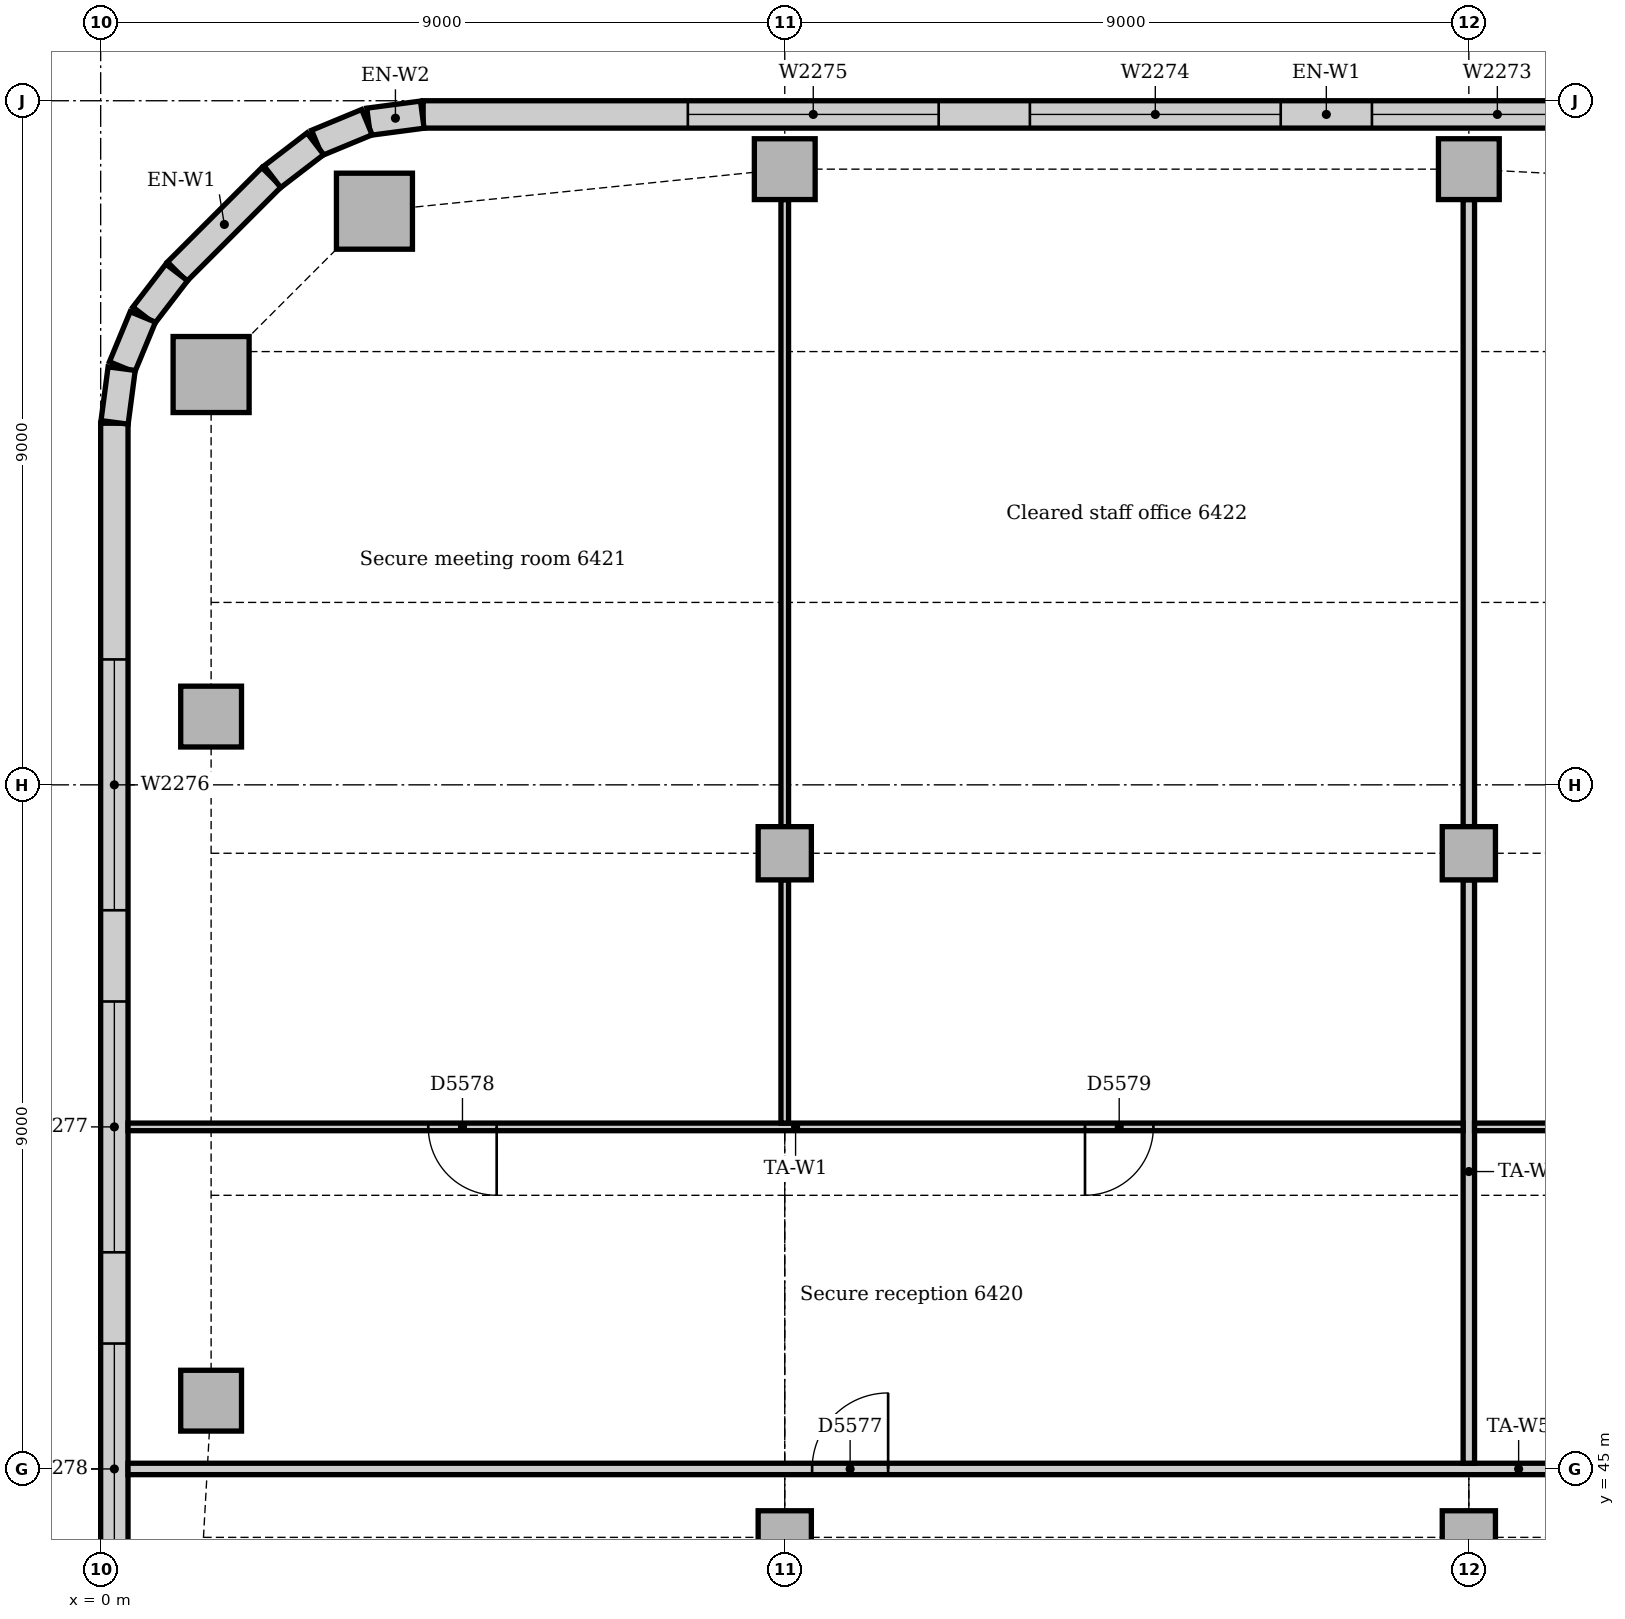
"""IFC4 building model, lengths in metres.
Left out: names, types, materials, properties, quantities, classifications, styles, units other than length and angle.
Written with IfcOpenShell. Run it as: python <this file> out.ifc"""

import sys

from ifc_helpers import new_model, si_unit, direction, frame, frame_2d, origin, origin_2d, place, context, subcontext, project, spatial, rectangle, extrude, element, fill, save


model = new_model("IFC4")
c1 = context("Model", 3, precision=1e-05, world=origin(), true_north=direction((0.0, 1.0)))
c2 = subcontext(c1, "Body", "Model", "MODEL_VIEW")
j1 = project(units=[si_unit("LENGTHUNIT", "METRE"), si_unit("PLANEANGLEUNIT", "RADIAN")], contexts=[c1])
p1 = place(None, origin())
s1 = spatial("IfcSite", under=j1, at=p1, CompositionType="ELEMENT")
p2 = place(p1, origin())
s2 = spatial("IfcBuilding", under=s1, at=p2, CompositionType="ELEMENT")
p3 = place(p2, frame((0.0, 0.0, 267.0)))
s3 = spatial("IfcBuildingStorey", under=s2, at=p3, CompositionType="ELEMENT", Elevation=267.0)
for number, where, z_axis, x_axis in (
    (1, (3.602, 61.547, 0.0), (0.0, 0.0, 1.0), (1.0, 0.0, 0.0)),
    (2, (1.453, 59.398, 0.0), (0.0, 0.0, 1.0), (1.0, 0.0, 0.0)),
):
    element("IfcColumn", number, at=place(p3, frame(where, z_axis=z_axis, x_axis=x_axis)), inside=s3, PredefinedType="COLUMN", context=c2, shape_type="SweptSolid", body=[
        extrude(rectangle(XDim=1.0, YDim=1.0, at=origin_2d()), origin(), (0.0, 0.0, 1.0), 3.85),
    ])
for number, where, z_axis, x_axis in (
    (3, (9.0, 62.1, 0.0), (0.0, 0.0, 1.0), (1.0, 0.0, 0.0)),
    (4, (18.0, 62.1, 0.0), (0.0, 0.0, 1.0), (1.0, 0.0, 0.0)),
    (5, (1.453, 45.898, 0.0), (0.0, 0.0, 1.0), (1.0, 0.0, 0.0)),
    (6, (1.453, 54.898, 0.0), (0.0, 0.0, 1.0), (1.0, 0.0, 0.0)),
):
    element("IfcColumn", number, at=place(p3, frame(where, z_axis=z_axis, x_axis=x_axis)), inside=s3, PredefinedType="COLUMN", context=c2, shape_type="SweptSolid", body=[
        extrude(rectangle(XDim=0.8, YDim=0.8, at=origin_2d()), origin(), (0.0, 0.0, 1.0), 3.85),
    ])
for number, where, z_axis, x_axis in (
    (7, (9.0, 44.1, 0.0), (0.0, 0.0, 1.0), (1.0, 0.0, 0.0)),
    (8, (9.0, 53.1, 0.0), (0.0, 0.0, 1.0), (1.0, 0.0, 0.0)),
    (9, (18.0, 44.1, 0.0), (0.0, 0.0, 1.0), (1.0, 0.0, 0.0)),
    (10, (18.0, 53.1, 0.0), (0.0, 0.0, 1.0), (1.0, 0.0, 0.0)),
):
    element("IfcColumn", number, at=place(p3, frame(where, z_axis=z_axis, x_axis=x_axis)), inside=s3, PredefinedType="COLUMN", context=c2, shape_type="SweptSolid", body=[
        extrude(rectangle(XDim=0.7, YDim=0.7, at=origin_2d()), origin(), (0.0, 0.0, 1.0), 3.85),
    ])
p4 = place(p3, frame((28.007, 62.82, 0.0), z_axis=(0.0, 0.0, 1.0), x_axis=(-1.0, 0.0, 0.0)))
e11 = element("IfcWall", 11, at=p4, inside=s3, PredefinedType="STANDARD", context=c2, shape_type="SweptSolid", body=[
    extrude(rectangle(XDim=23.765, YDim=0.36, at=frame_2d((11.882, 0.0))), origin(), (0.0, 0.0, 1.0), 3.85),
])
p5 = place(p4, frame((3.482, 0.0, 0.9)))
e12 = element("IfcOpeningElement", 12, at=p5, cuts=e11, PredefinedType="OPENING", context=c2, shape_type="SweptSolid", body=[
    extrude(rectangle(XDim=3.3, YDim=1.6, at=frame_2d((1.65, 0.8))), frame((0.0, 0.19, 0.0), z_axis=(0.0, -1.0, 0.0), x_axis=(1.0, 0.0, 0.0)), (0.0, 0.0, 1.0), 0.38),
])
p6 = place(p4, frame((7.982, 0.0, 0.9)))
e13 = element("IfcOpeningElement", 13, at=p6, cuts=e11, PredefinedType="OPENING", context=c2, shape_type="SweptSolid", body=[
    extrude(rectangle(XDim=3.3, YDim=1.6, at=frame_2d((1.65, 0.8))), frame((0.0, 0.19, 0.0), z_axis=(0.0, -1.0, 0.0), x_axis=(1.0, 0.0, 0.0)), (0.0, 0.0, 1.0), 0.38),
])
p7 = place(p4, frame((12.482, 0.0, 0.9)))
e14 = element("IfcOpeningElement", 14, at=p7, cuts=e11, PredefinedType="OPENING", context=c2, shape_type="SweptSolid", body=[
    extrude(rectangle(XDim=3.3, YDim=1.6, at=frame_2d((1.65, 0.8))), frame((0.0, 0.19, 0.0), z_axis=(0.0, -1.0, 0.0), x_axis=(1.0, 0.0, 0.0)), (0.0, 0.0, 1.0), 0.38),
])
p8 = place(p4, frame((16.982, 0.0, 0.9)))
e15 = element("IfcOpeningElement", 15, at=p8, cuts=e11, PredefinedType="OPENING", context=c2, shape_type="SweptSolid", body=[
    extrude(rectangle(XDim=3.3, YDim=1.6, at=frame_2d((1.65, 0.8))), frame((0.0, 0.19, 0.0), z_axis=(0.0, -1.0, 0.0), x_axis=(1.0, 0.0, 0.0)), (0.0, 0.0, 1.0), 0.38),
])
p9 = place(p3, frame((2.249, 61.994, 0.0), z_axis=(0.0, 0.0, 1.0), x_axis=(-0.707106781187, -0.707106781187, 0.0)))
e16 = element("IfcWall", 16, at=p9, inside=s3, PredefinedType="STANDARD", context=c2, shape_type="SweptSolid", body=[
    extrude(rectangle(XDim=1.757, YDim=0.36, at=frame_2d((0.879, 0.0))), origin(), (0.0, 0.0, 1.0), 3.85),
])
p10 = place(p3, frame((0.18, 58.757, 0.0), z_axis=(0.0, 0.0, 1.0), x_axis=(0.0, -1.0, 0.0)))
e17 = element("IfcWall", 17, at=p10, inside=s3, PredefinedType="STANDARD", context=c2, shape_type="SweptSolid", body=[
    extrude(rectangle(XDim=16.757, YDim=0.36, at=frame_2d((8.379, 0.0))), origin(), (0.0, 0.0, 1.0), 3.85),
])
p11 = place(p10, frame((3.107, 0.0, 0.9)))
e18 = element("IfcOpeningElement", 18, at=p11, cuts=e17, PredefinedType="OPENING", context=c2, shape_type="SweptSolid", body=[
    extrude(rectangle(XDim=3.3, YDim=1.6, at=frame_2d((1.65, 0.8))), frame((0.0, 0.19, 0.0), z_axis=(0.0, -1.0, 0.0), x_axis=(1.0, 0.0, 0.0)), (0.0, 0.0, 1.0), 0.38),
])
p12 = place(p10, frame((7.607, 0.0, 0.9)))
e19 = element("IfcOpeningElement", 19, at=p12, cuts=e17, PredefinedType="OPENING", context=c2, shape_type="SweptSolid", body=[
    extrude(rectangle(XDim=3.3, YDim=1.6, at=frame_2d((1.65, 0.8))), frame((0.0, 0.19, 0.0), z_axis=(0.0, -1.0, 0.0), x_axis=(1.0, 0.0, 0.0)), (0.0, 0.0, 1.0), 0.38),
])
p13 = place(p10, frame((12.107, 0.0, 0.9)))
e20 = element("IfcOpeningElement", 20, at=p13, cuts=e17, PredefinedType="OPENING", context=c2, shape_type="SweptSolid", body=[
    extrude(rectangle(XDim=3.3, YDim=1.6, at=frame_2d((1.65, 0.8))), frame((0.0, 0.19, 0.0), z_axis=(0.0, -1.0, 0.0), x_axis=(1.0, 0.0, 0.0)), (0.0, 0.0, 1.0), 0.38),
])
for number, where, z_axis, x_axis in (
    (21, (4.231, 62.817, 0.0), (0.0, 0.0, 1.0), (-0.991, -0.131, 0.0)),
    (22, (3.503, 62.718, 0.0), (0.0, 0.0, 1.0), (-0.924, -0.383, 0.0)),
):
    element("IfcWall", number, at=place(p3, frame(where, z_axis=z_axis, x_axis=x_axis)), inside=s3, PredefinedType="STANDARD", context=c2, shape_type="SweptSolid", body=[
        extrude(rectangle(XDim=0.713, YDim=0.36, at=frame_2d((0.356, 0.0))), origin(), (0.0, 0.0, 1.0), 3.85),
    ])
for number, where, z_axis, x_axis in (
    (23, (2.825, 62.434, 0.0), (0.0, 0.0, 1.0), (-0.793, -0.609, 0.0)),
    (24, (1.0, 60.741, 0.0), (0.0, 0.0, 1.0), (-0.609, -0.793, 0.0)),
):
    element("IfcWall", number, at=place(p3, frame(where, z_axis=z_axis, x_axis=x_axis)), inside=s3, PredefinedType="STANDARD", context=c2, shape_type="SweptSolid", body=[
        extrude(rectangle(XDim=0.713, YDim=0.36, at=frame_2d((0.357, 0.0))), origin(), (0.0, 0.0, 1.0), 3.85),
    ])
for number, where, z_axis, x_axis in (
    (25, (0.555, 60.156, 0.0), (0.0, 0.0, 1.0), (-0.383, -0.924, 0.0)),
    (26, (0.276, 59.476, 0.0), (0.0, 0.0, 1.0), (-0.131, -0.991, 0.0)),
):
    element("IfcWall", number, at=place(p3, frame(where, z_axis=z_axis, x_axis=x_axis)), inside=s3, PredefinedType="STANDARD", context=c2, shape_type="SweptSolid", body=[
        extrude(rectangle(XDim=0.713, YDim=0.36, at=frame_2d((0.356, 0.0))), origin(), (0.0, 0.0, 1.0), 3.85),
    ])
p14 = place(p3, frame((0.36, 45.0, 0.0), z_axis=(0.0, 0.0, 1.0), x_axis=(1.0, 0.0, 0.0)))
e27 = element("IfcWall", 27, at=p14, inside=s3, PredefinedType="PARTITIONING", context=c2, shape_type="SweptSolid", body=[
    extrude(rectangle(XDim=36.59, YDim=0.15, at=frame_2d((18.295, 0.0))), origin(), (0.0, 0.0, 1.0), 3.85),
])
p15 = place(p14, frame((9.0, 0.0, 0.0)))
e28 = element("IfcOpeningElement", 28, at=p15, cuts=e27, PredefinedType="OPENING", context=c2, shape_type="SweptSolid", body=[
    extrude(rectangle(XDim=1.0, YDim=2.1, at=frame_2d((0.5, 1.05))), frame((0.0, 0.085, 0.0), z_axis=(0.0, -1.0, 0.0), x_axis=(1.0, 0.0, 0.0)), (0.0, 0.0, 1.0), 0.17),
])
p16 = place(p14, frame((23.89, 0.0, 0.0)))
e29 = element("IfcOpeningElement", 29, at=p16, cuts=e27, PredefinedType="OPENING", context=c2, shape_type="SweptSolid", body=[
    extrude(rectangle(XDim=1.0, YDim=2.1, at=frame_2d((0.5, 1.05))), frame((0.0, 0.085, 0.0), z_axis=(0.0, -1.0, 0.0), x_axis=(1.0, 0.0, 0.0)), (0.0, 0.0, 1.0), 0.17),
])
p17 = place(p14, frame((33.34, 0.0, 0.0)))
e30 = element("IfcOpeningElement", 30, at=p17, cuts=e27, PredefinedType="OPENING", context=c2, shape_type="SweptSolid", body=[
    extrude(rectangle(XDim=0.9, YDim=2.1, at=frame_2d((0.45, 1.05))), frame((0.0, 0.085, 0.0), z_axis=(0.0, -1.0, 0.0), x_axis=(1.0, 0.0, 0.0)), (0.0, 0.0, 1.0), 0.17),
])
p18 = place(p3, frame((18.0, 45.075, 0.0), z_axis=(0.0, 0.0, 1.0), x_axis=(0.0, 1.0, 0.0)))
e31 = element("IfcWall", 31, at=p18, inside=s3, PredefinedType="PARTITIONING", context=c2, shape_type="SweptSolid", body=[
    extrude(rectangle(XDim=7.675, YDim=0.15, at=frame_2d((3.837, 0.0))), origin(), (0.0, 0.0, 1.0), 3.4),
])
p19 = place(p3, frame((18.0, 53.45, 0.0), z_axis=(0.0, 0.0, 1.0), x_axis=(0.0, 1.0, 0.0)))
e32 = element("IfcWall", 32, at=p19, inside=s3, PredefinedType="PARTITIONING", context=c2, shape_type="SweptSolid", body=[
    extrude(rectangle(XDim=8.25, YDim=0.15, at=frame_2d((4.125, 0.0))), origin(), (0.0, 0.0, 1.0), 3.4),
])
p20 = place(p3, frame((18.075, 49.5, 0.0), z_axis=(0.0, 0.0, 1.0), x_axis=(1.0, 0.0, 0.0)))
e33 = element("IfcWall", 33, at=p20, inside=s3, PredefinedType="PARTITIONING", context=c2, shape_type="SweptSolid", body=[
    extrude(rectangle(XDim=13.475, YDim=0.1, at=frame_2d((6.737, 0.0))), origin(), (0.0, 0.0, 1.0), 3.85),
])
p21 = place(p20, frame((2.95, 0.0, 0.0)))
e34 = element("IfcOpeningElement", 34, at=p21, cuts=e33, PredefinedType="OPENING", context=c2, shape_type="SweptSolid", body=[
    extrude(rectangle(XDim=0.9, YDim=2.1, at=frame_2d((0.45, 1.05))), frame((0.0, 0.06, 0.0), z_axis=(0.0, -1.0, 0.0), x_axis=(1.0, 0.0, 0.0)), (0.0, 0.0, 1.0), 0.12),
])
p22 = place(p20, frame((9.525, 0.0, 0.0)))
e35 = element("IfcOpeningElement", 35, at=p22, cuts=e33, PredefinedType="OPENING", context=c2, shape_type="SweptSolid", body=[
    extrude(rectangle(XDim=0.9, YDim=2.1, at=frame_2d((0.45, 1.05))), frame((0.0, 0.06, 0.0), z_axis=(0.0, -1.0, 0.0), x_axis=(1.0, 0.0, 0.0)), (0.0, 0.0, 1.0), 0.12),
])
p23 = place(p3, frame((0.36, 49.5, 0.0), z_axis=(0.0, 0.0, 1.0), x_axis=(1.0, 0.0, 0.0)))
e36 = element("IfcWall", 36, at=p23, inside=s3, PredefinedType="PARTITIONING", context=c2, shape_type="SweptSolid", body=[
    extrude(rectangle(XDim=17.565, YDim=0.1, at=frame_2d((8.783, 0.0))), origin(), (0.0, 0.0, 1.0), 3.85),
])
p24 = place(p23, frame((3.95, 0.0, 0.0)))
e37 = element("IfcOpeningElement", 37, at=p24, cuts=e36, PredefinedType="OPENING", context=c2, shape_type="SweptSolid", body=[
    extrude(rectangle(XDim=0.9, YDim=2.1, at=frame_2d((0.45, 1.05))), frame((0.0, 0.06, 0.0), z_axis=(0.0, -1.0, 0.0), x_axis=(1.0, 0.0, 0.0)), (0.0, 0.0, 1.0), 0.12),
])
p25 = place(p23, frame((12.59, 0.0, 0.0)))
e38 = element("IfcOpeningElement", 38, at=p25, cuts=e36, PredefinedType="OPENING", context=c2, shape_type="SweptSolid", body=[
    extrude(rectangle(XDim=0.9, YDim=2.1, at=frame_2d((0.45, 1.05))), frame((0.0, 0.06, 0.0), z_axis=(0.0, -1.0, 0.0), x_axis=(1.0, 0.0, 0.0)), (0.0, 0.0, 1.0), 0.12),
])
p26 = place(p3, frame((9.0, 49.55, 0.0), z_axis=(0.0, 0.0, 1.0), x_axis=(0.0, 1.0, 0.0)))
e39 = element("IfcWall", 39, at=p26, inside=s3, PredefinedType="PARTITIONING", context=c2, shape_type="SweptSolid", body=[
    extrude(rectangle(XDim=3.2, YDim=0.1, at=frame_2d((1.6, 0.0))), origin(), (0.0, 0.0, 1.0), 3.4),
])
p27 = place(p3, frame((9.0, 53.45, 0.0), z_axis=(0.0, 0.0, 1.0), x_axis=(0.0, 1.0, 0.0)))
e40 = element("IfcWall", 40, at=p27, inside=s3, PredefinedType="PARTITIONING", context=c2, shape_type="SweptSolid", body=[
    extrude(rectangle(XDim=8.25, YDim=0.1, at=frame_2d((4.125, 0.0))), origin(), (0.0, 0.0, 1.0), 3.4),
])
p28 = place(p6, origin())
e41 = element("IfcWindow", 41, at=p28, inside=s3, PartitioningType="SINGLE_PANEL", PredefinedType="WINDOW", context=c2, shape_type="SweptSolid", body=[
    extrude(rectangle(XDim=3.3, YDim=1.6, at=frame_2d((1.65, 0.8))), frame((0.0, 0.13, 0.0), z_axis=(0.0, -1.0, 0.0), x_axis=(1.0, 0.0, 0.0)), (0.0, 0.0, 1.0), 0.06),
])
fill(e13, e41)
p29 = place(p7, origin())
e42 = element("IfcWindow", 42, at=p29, inside=s3, PartitioningType="SINGLE_PANEL", PredefinedType="WINDOW", context=c2, shape_type="SweptSolid", body=[
    extrude(rectangle(XDim=3.3, YDim=1.6, at=frame_2d((1.65, 0.8))), frame((0.0, 0.13, 0.0), z_axis=(0.0, -1.0, 0.0), x_axis=(1.0, 0.0, 0.0)), (0.0, 0.0, 1.0), 0.06),
])
fill(e14, e42)
p30 = place(p8, origin())
e43 = element("IfcWindow", 43, at=p30, inside=s3, PartitioningType="SINGLE_PANEL", PredefinedType="WINDOW", context=c2, shape_type="SweptSolid", body=[
    extrude(rectangle(XDim=3.3, YDim=1.6, at=frame_2d((1.65, 0.8))), frame((0.0, 0.13, 0.0), z_axis=(0.0, -1.0, 0.0), x_axis=(1.0, 0.0, 0.0)), (0.0, 0.0, 1.0), 0.06),
])
fill(e15, e43)
p31 = place(p11, origin())
e44 = element("IfcWindow", 44, at=p31, inside=s3, PartitioningType="SINGLE_PANEL", PredefinedType="WINDOW", context=c2, shape_type="SweptSolid", body=[
    extrude(rectangle(XDim=3.3, YDim=1.6, at=frame_2d((1.65, 0.8))), frame((0.0, 0.13, 0.0), z_axis=(0.0, -1.0, 0.0), x_axis=(1.0, 0.0, 0.0)), (0.0, 0.0, 1.0), 0.06),
])
fill(e18, e44)
p32 = place(p12, origin())
e45 = element("IfcWindow", 45, at=p32, inside=s3, PartitioningType="SINGLE_PANEL", PredefinedType="WINDOW", context=c2, shape_type="SweptSolid", body=[
    extrude(rectangle(XDim=3.3, YDim=1.6, at=frame_2d((1.65, 0.8))), frame((0.0, 0.13, 0.0), z_axis=(0.0, -1.0, 0.0), x_axis=(1.0, 0.0, 0.0)), (0.0, 0.0, 1.0), 0.06),
])
fill(e19, e45)
p33 = place(p13, origin())
e46 = element("IfcWindow", 46, at=p33, inside=s3, PartitioningType="SINGLE_PANEL", PredefinedType="WINDOW", context=c2, shape_type="SweptSolid", body=[
    extrude(rectangle(XDim=3.3, YDim=1.6, at=frame_2d((1.65, 0.8))), frame((0.0, 0.13, 0.0), z_axis=(0.0, -1.0, 0.0), x_axis=(1.0, 0.0, 0.0)), (0.0, 0.0, 1.0), 0.06),
])
fill(e20, e46)
p34 = place(p15, origin())
e47 = element("IfcDoor", 47, at=p34, inside=s3, OperationType="SINGLE_SWING_RIGHT", PredefinedType="DOOR", context=c2, shape_type="SweptSolid", body=[
    extrude(rectangle(XDim=1.0, YDim=2.1, at=frame_2d((0.5, 1.05))), frame((0.0, 0.025, 0.0), z_axis=(0.0, -1.0, 0.0), x_axis=(1.0, 0.0, 0.0)), (0.0, 0.0, 1.0), 0.05),
])
fill(e28, e47)
p35 = place(p24, frame((0.9, 0.0, 0.0), z_axis=(0.0, 0.0, 1.0), x_axis=(-1.0, 0.0, 0.0)))
e48 = element("IfcDoor", 48, at=p35, inside=s3, OperationType="SINGLE_SWING_LEFT", PredefinedType="DOOR", context=c2, shape_type="SweptSolid", body=[
    extrude(rectangle(XDim=0.9, YDim=2.1, at=frame_2d((0.45, 1.05))), frame((0.0, 0.025, 0.0), z_axis=(0.0, -1.0, 0.0), x_axis=(1.0, 0.0, 0.0)), (0.0, 0.0, 1.0), 0.05),
])
fill(e37, e48)
p36 = place(p25, frame((0.9, 0.0, 0.0), z_axis=(0.0, 0.0, 1.0), x_axis=(-1.0, 0.0, 0.0)))
e49 = element("IfcDoor", 49, at=p36, inside=s3, OperationType="SINGLE_SWING_RIGHT", PredefinedType="DOOR", context=c2, shape_type="SweptSolid", body=[
    extrude(rectangle(XDim=0.9, YDim=2.1, at=frame_2d((0.45, 1.05))), frame((0.0, 0.025, 0.0), z_axis=(0.0, -1.0, 0.0), x_axis=(1.0, 0.0, 0.0)), (0.0, 0.0, 1.0), 0.05),
])
fill(e38, e49)
save(model, sys.argv[1])
